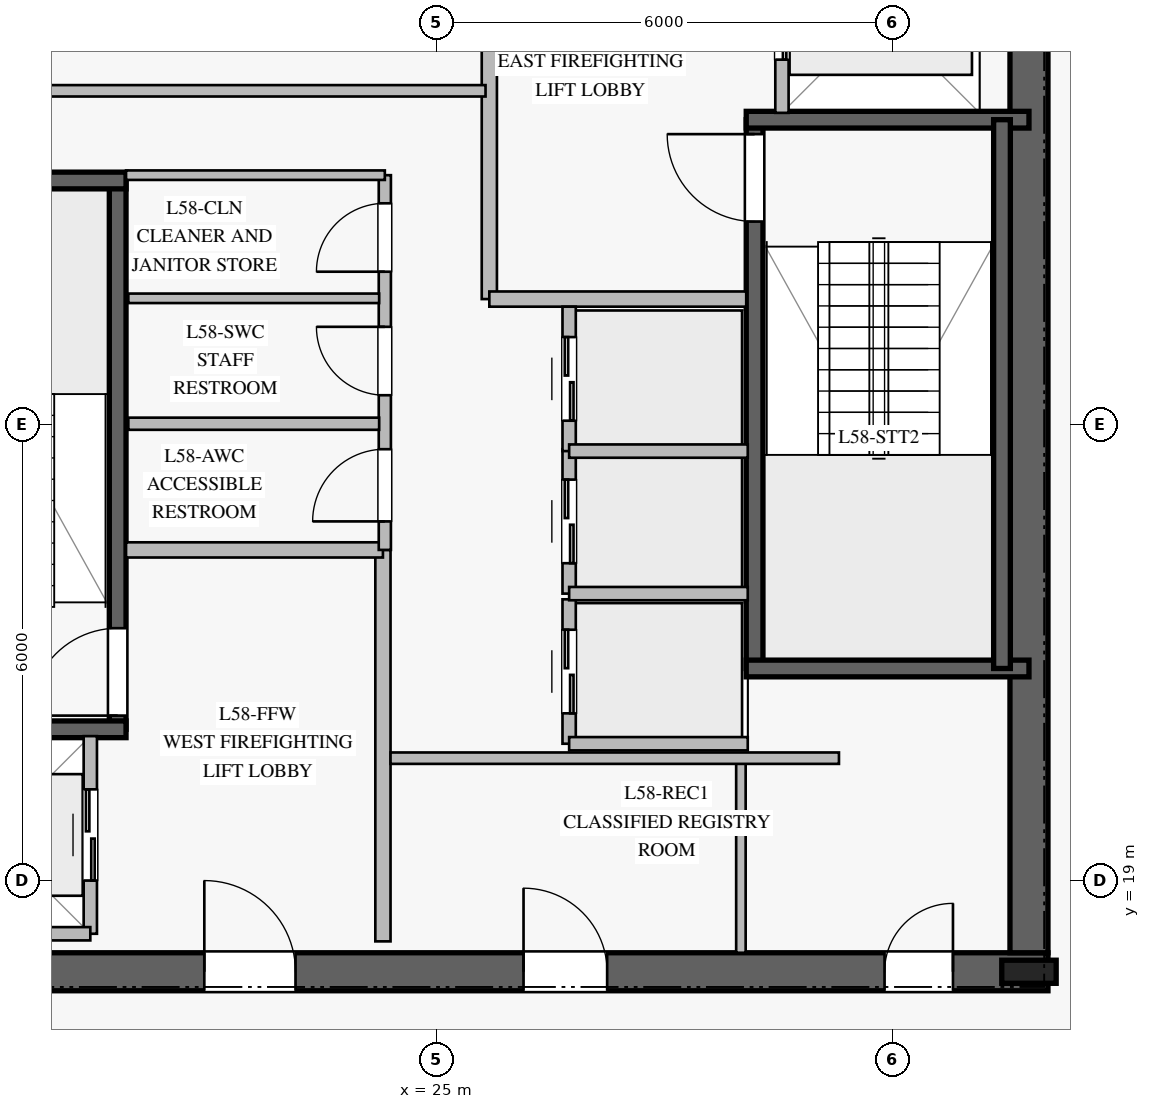
"""IFC4 building model, lengths in metres.
Left out: names, types, materials, properties, quantities, classifications, styles, units other than length and angle.
Written with IfcOpenShell. Run it as: python <this file> out.ifc"""

import sys

from ifc_helpers import new_model, si_unit, direction, frame, frame_2d, origin, origin_2d, place, context, subcontext, project, spatial, rectangle, i_section, extrude, element, fill, save


model = new_model("IFC4")
c1 = context("Model", 3, precision=1e-05, world=origin(), true_north=direction((0.0, 1.0)))
c2 = subcontext(c1, "Body", "Model", "MODEL_VIEW")
j1 = project(units=[si_unit("LENGTHUNIT", "METRE"), si_unit("PLANEANGLEUNIT", "RADIAN")], contexts=[c1])
p1 = place(None, origin())
s1 = spatial("IfcSite", under=j1, at=p1, CompositionType="ELEMENT")
p2 = place(p1, origin())
s2 = spatial("IfcBuilding", under=s1, at=p2, CompositionType="ELEMENT")
p3 = place(p2, frame((0.0, 0.0, 240.8)))
s3 = spatial("IfcBuildingStorey", under=s2, at=p3, CompositionType="ELEMENT", Elevation=240.8)
p4 = place(p3, frame((16.95, 17.8, 0.0), z_axis=(0.0, 0.0, 1.0), x_axis=(1.0, 0.0, 0.0)))
e1 = element("IfcWall", 1, at=p4, inside=s3, PredefinedType="SHEAR", context=c2, shape_type="SweptSolid", body=[
    extrude(rectangle(XDim=16.1, YDim=0.5, at=frame_2d((8.05, 0.0))), origin(), (0.0, 0.0, 1.0), 3.7),
])
p5 = place(p4, frame((5.0, 0.0, 0.0)))
e2 = element("IfcOpeningElement", 2, at=p5, cuts=e1, PredefinedType="OPENING", context=c2, shape_type="SweptSolid", body=[
    extrude(rectangle(XDim=1.2, YDim=2.25, at=frame_2d((0.6, 1.125))), frame((0.0, 0.26, 0.0), z_axis=(0.0, -1.0, 0.0), x_axis=(1.0, 0.0, 0.0)), (0.0, 0.0, 1.0), 0.52),
])
p6 = place(p4, frame((13.95, 0.0, 0.0)))
e3 = element("IfcOpeningElement", 3, at=p6, cuts=e1, PredefinedType="OPENING", context=c2, shape_type="SweptSolid", body=[
    extrude(rectangle(XDim=0.9, YDim=2.1, at=frame_2d((0.45, 1.05))), frame((0.0, 0.26, 0.0), z_axis=(0.0, -1.0, 0.0), x_axis=(1.0, 0.0, 0.0)), (0.0, 0.0, 1.0), 0.52),
])
p7 = place(p4, frame((9.2, 0.0, 0.0)))
e4 = element("IfcOpeningElement", 4, at=p7, cuts=e1, PredefinedType="OPENING", context=c2, shape_type="SweptSolid", body=[
    extrude(rectangle(XDim=1.1, YDim=2.2, at=frame_2d((0.55, 1.1))), frame((0.0, 0.26, 0.0), z_axis=(0.0, -1.0, 0.0), x_axis=(1.0, 0.0, 0.0)), (0.0, 0.0, 1.0), 0.52),
])
p8 = place(p3, frame((32.8, 18.05, 0.0), z_axis=(0.0, 0.0, 1.0), x_axis=(0.0, 1.0, 0.0)))
e5 = element("IfcWall", 5, at=p8, inside=s3, PredefinedType="SHEAR", context=c2, shape_type="SweptSolid", body=[
    extrude(rectangle(XDim=13.9, YDim=0.5, at=frame_2d((6.95, 0.0))), origin(), (0.0, 0.0, 1.0), 3.7),
])
p9 = place(p3, frame((32.8, 17.8, 0.0), z_axis=(0.0, 0.0, 1.0), x_axis=(1.0, 0.0, 0.0)))
e6 = element("IfcColumn", 6, at=p9, inside=s3, PredefinedType="COLUMN", context=c2, shape_type="SweptSolid", body=[
    extrude(i_section(OverallWidth=0.304, OverallDepth=0.716, WebThickness=0.021, FlangeThickness=0.04, at=origin_2d()), origin(), (0.0, 0.0, 1.0), 4.0),
])
p10 = place(p3, frame((20.81, 20.99, 0.0), z_axis=(0.0, 0.0, 1.0), x_axis=(0.0, 1.0, 0.0)))
e7 = element("IfcWall", 7, at=p10, inside=s3, PredefinedType="SOLIDWALL", context=c2, shape_type="SweptSolid", body=[
    extrude(rectangle(XDim=7.22, YDim=0.22, at=frame_2d((3.61, 0.0))), origin(), (0.0, 0.0, 1.0), 3.7),
])
p11 = place(p10, frame((0.18, 0.0, 0.0)))
e8 = element("IfcOpeningElement", 8, at=p11, cuts=e7, PredefinedType="OPENING", context=c2, shape_type="SweptSolid", body=[
    extrude(rectangle(XDim=1.15, YDim=2.2, at=frame_2d((0.575, 1.1))), frame((0.0, 0.12, 0.0), z_axis=(0.0, -1.0, 0.0), x_axis=(1.0, 0.0, 0.0)), (0.0, 0.0, 1.0), 0.24),
])
for number, where, z_axis, x_axis in (
    (9, (17.2, 20.99, 0.0), (0.0, 0.0, 1.0), (1.0, 0.0, 0.0)),
    (10, (17.2, 28.21, 0.0), (0.0, 0.0, 1.0), (1.0, 0.0, 0.0)),
):
    element("IfcWall", number, at=place(p3, frame(where, z_axis=z_axis, x_axis=x_axis)), inside=s3, PredefinedType="SOLIDWALL", context=c2, shape_type="SweptSolid", body=[
        extrude(rectangle(XDim=3.72, YDim=0.22, at=frame_2d((1.86, 0.0))), origin(), (0.0, 0.0, 1.0), 3.7),
    ])
p12 = place(p3, frame((29.19, 21.79, 0.0), z_axis=(0.0, 0.0, 1.0), x_axis=(0.0, 1.0, 0.0)))
e11 = element("IfcWall", 11, at=p12, inside=s3, PredefinedType="SOLIDWALL", context=c2, shape_type="SweptSolid", body=[
    extrude(rectangle(XDim=7.22, YDim=0.22, at=frame_2d((3.61, 0.0))), origin(), (0.0, 0.0, 1.0), 3.7),
])
p13 = place(p12, frame((5.88, 0.0, 0.0)))
e12 = element("IfcOpeningElement", 12, at=p13, cuts=e11, PredefinedType="OPENING", context=c2, shape_type="SweptSolid", body=[
    extrude(rectangle(XDim=1.15, YDim=2.2, at=frame_2d((0.575, 1.1))), frame((0.0, 0.12, 0.0), z_axis=(0.0, -1.0, 0.0), x_axis=(1.0, 0.0, 0.0)), (0.0, 0.0, 1.0), 0.24),
])
for number, where, z_axis, x_axis in (
    (13, (29.08, 21.79, 0.0), (0.0, 0.0, 1.0), (1.0, 0.0, 0.0)),
    (14, (29.08, 29.01, 0.0), (0.0, 0.0, 1.0), (1.0, 0.0, 0.0)),
):
    element("IfcWall", number, at=place(p3, frame(where, z_axis=z_axis, x_axis=x_axis)), inside=s3, PredefinedType="SOLIDWALL", context=c2, shape_type="SweptSolid", body=[
        extrude(rectangle(XDim=3.72, YDim=0.22, at=frame_2d((1.86, 0.0))), origin(), (0.0, 0.0, 1.0), 3.7),
    ])
p14 = place(p3, frame((32.445, 29.01, 0.0), z_axis=(0.0, 0.0, 1.0), x_axis=(0.0, -1.0, 0.0)))
e15 = element("IfcWall", 15, at=p14, inside=s3, PredefinedType="SOLIDWALL", context=c2, shape_type="SweptSolid", body=[
    extrude(rectangle(XDim=7.22, YDim=0.22, at=frame_2d((3.61, 0.0))), origin(), (0.0, 0.0, 1.0), 3.7),
])
p15 = place(p3, frame((24.3, 18.2, 0.0), z_axis=(0.0, 0.0, 1.0), x_axis=(0.0, 1.0, 0.0)))
e16 = element("IfcWall", 16, at=p15, inside=s3, PredefinedType="PARTITIONING", context=c2, shape_type="SweptSolid", body=[
    extrude(rectangle(XDim=5.15, YDim=0.2, at=frame_2d((2.575, 0.0))), origin(), (0.0, 0.0, 1.0), 3.7),
])
p16 = place(p3, frame((20.92, 23.35, 0.0), z_axis=(0.0, 0.0, 1.0), x_axis=(1.0, 0.0, 0.0)))
e17 = element("IfcWall", 17, at=p16, inside=s3, PredefinedType="PARTITIONING", context=c2, shape_type="SweptSolid", body=[
    extrude(rectangle(XDim=3.38, YDim=0.2, at=frame_2d((1.69, 0.0))), origin(), (0.0, 0.0, 1.0), 3.7),
])
p17 = place(p3, frame((25.7, 26.65, 0.0), z_axis=(0.0, 0.0, 1.0), x_axis=(0.0, 1.0, 0.0)))
e18 = element("IfcWall", 18, at=p17, inside=s3, PredefinedType="PARTITIONING", context=c2, shape_type="SweptSolid", body=[
    extrude(rectangle(XDim=5.15, YDim=0.2, at=frame_2d((2.575, 0.0))), origin(), (0.0, 0.0, 1.0), 3.7),
])
p18 = place(p3, frame((25.7, 26.65, 0.0), z_axis=(0.0, 0.0, 1.0), x_axis=(1.0, 0.0, 0.0)))
e19 = element("IfcWall", 19, at=p18, inside=s3, PredefinedType="PARTITIONING", context=c2, shape_type="SweptSolid", body=[
    extrude(rectangle(XDim=3.38, YDim=0.2, at=frame_2d((1.69, 0.0))), origin(), (0.0, 0.0, 1.0), 3.7),
])
p19 = place(p3, frame((24.325, 23.35, 0.0), z_axis=(0.0, 0.0, 1.0), x_axis=(0.0, 1.0, 0.0)))
e20 = element("IfcWall", 20, at=p19, inside=s3, PredefinedType="PLUMBINGWALL", context=c2, shape_type="SweptSolid", body=[
    extrude(rectangle(XDim=4.93, YDim=0.16, at=frame_2d((2.465, 0.0))), origin(), (0.0, 0.0, 1.0), 3.7),
])
p20 = place(p19, frame((0.375, 0.0, 0.0)))
e21 = element("IfcOpeningElement", 21, at=p20, cuts=e20, PredefinedType="OPENING", context=c2, shape_type="SweptSolid", body=[
    extrude(rectangle(XDim=0.95, YDim=2.1, at=frame_2d((0.475, 1.05))), frame((0.0, 0.09, 0.0), z_axis=(0.0, -1.0, 0.0), x_axis=(1.0, 0.0, 0.0)), (0.0, 0.0, 1.0), 0.18),
])
p21 = place(p19, frame((2.035, 0.0, 0.0)))
e22 = element("IfcOpeningElement", 22, at=p21, cuts=e20, PredefinedType="OPENING", context=c2, shape_type="SweptSolid", body=[
    extrude(rectangle(XDim=0.9, YDim=2.1, at=frame_2d((0.45, 1.05))), frame((0.0, 0.09, 0.0), z_axis=(0.0, -1.0, 0.0), x_axis=(1.0, 0.0, 0.0)), (0.0, 0.0, 1.0), 0.18),
])
p22 = place(p19, frame((3.66, 0.0, 0.0)))
e23 = element("IfcOpeningElement", 23, at=p22, cuts=e20, PredefinedType="OPENING", context=c2, shape_type="SweptSolid", body=[
    extrude(rectangle(XDim=0.9, YDim=2.1, at=frame_2d((0.45, 1.05))), frame((0.0, 0.09, 0.0), z_axis=(0.0, -1.0, 0.0), x_axis=(1.0, 0.0, 0.0)), (0.0, 0.0, 1.0), 0.18),
])
p23 = place(p3, frame((20.92, 28.28, 0.0), z_axis=(0.0, 0.0, 1.0), x_axis=(1.0, 0.0, 0.0)))
e24 = element("IfcWall", 24, at=p23, inside=s3, PredefinedType="PARTITIONING", context=c2, shape_type="SweptSolid", body=[
    extrude(rectangle(XDim=3.405, YDim=0.125, at=frame_2d((1.703, 0.0))), origin(), (0.0, 0.0, 1.0), 3.7),
])
p24 = place(p3, frame((29.01, 18.05, 0.0), z_axis=(0.0, 0.0, 1.0), x_axis=(0.0, 1.0, 0.0)))
e25 = element("IfcWall", 25, at=p24, inside=s3, PredefinedType="PARTITIONING", context=c2, shape_type="SweptSolid", body=[
    extrude(rectangle(XDim=2.5, YDim=0.125, at=frame_2d((1.25, 0.0))), origin(), (0.0, 0.0, 1.0), 3.0),
])
p25 = place(p3, frame((20.95, 25.01, 0.0), z_axis=(0.0, 0.0, 1.0), x_axis=(1.0, 0.0, 0.0)))
e26 = element("IfcWall", 26, at=p25, inside=s3, PredefinedType="PLUMBINGWALL", context=c2, shape_type="SweptSolid", body=[
    extrude(rectangle(XDim=3.3, YDim=0.16, at=frame_2d((1.65, 0.0))), origin(), (0.0, 0.0, 1.0), 3.7),
])
p26 = place(p3, frame((20.95, 26.66, 0.0), z_axis=(0.0, 0.0, 1.0), x_axis=(1.0, 0.0, 0.0)))
e27 = element("IfcWall", 27, at=p26, inside=s3, PredefinedType="PARTITIONING", context=c2, shape_type="SweptSolid", body=[
    extrude(rectangle(XDim=3.3, YDim=0.125, at=frame_2d((1.65, 0.0))), origin(), (0.0, 0.0, 1.0), 3.7),
])
p27 = place(p3, frame((24.4, 20.61, 0.0), z_axis=(0.0, 0.0, 1.0), x_axis=(1.0, 0.0, 0.0)))
e28 = element("IfcWall", 28, at=p27, inside=s3, PredefinedType="PARTITIONING", context=c2, shape_type="SweptSolid", body=[
    extrude(rectangle(XDim=5.9, YDim=0.15, at=frame_2d((2.95, 0.0))), origin(), (0.0, 0.0, 1.0), 3.7),
])
p28 = place(p3, frame((19.75, 29.39, 0.0), z_axis=(0.0, 0.0, 1.0), x_axis=(1.0, 0.0, 0.0)))
e29 = element("IfcWall", 29, at=p28, inside=s3, PredefinedType="PARTITIONING", context=c2, shape_type="SweptSolid", body=[
    extrude(rectangle(XDim=5.9, YDim=0.15, at=frame_2d((2.95, 0.0))), origin(), (0.0, 0.0, 1.0), 3.7),
])
p29 = place(p3, frame((26.75, 20.8, 0.0), z_axis=(0.0, 0.0, 1.0), x_axis=(0.0, 1.0, 0.0)))
e30 = element("IfcWall", 30, at=p29, inside=s3, PredefinedType="PARTITIONING", context=c2, shape_type="SweptSolid", body=[
    extrude(rectangle(XDim=1.9, YDim=0.175, at=frame_2d((0.95, 0.0))), origin(), (0.0, 0.0, 1.0), 3.7),
])
p30 = place(p29, frame((0.4, 0.0, 0.0)))
e31 = element("IfcOpeningElement", 31, at=p30, cuts=e30, PredefinedType="OPENING", context=c2, shape_type="SweptSolid", body=[
    extrude(rectangle(XDim=1.1, YDim=2.2, at=frame_2d((0.55, 1.1))), frame((0.0, 0.098, 0.0), z_axis=(0.0, -1.0, 0.0), x_axis=(1.0, 0.0, 0.0)), (0.0, 0.0, 1.0), 0.195),
])
p31 = place(p3, frame((26.75, 20.8, 0.0), z_axis=(0.0, 0.0, 1.0), x_axis=(1.0, 0.0, 0.0)))
e32 = element("IfcWall", 32, at=p31, inside=s3, PredefinedType="PARTITIONING", context=c2, shape_type="SweptSolid", body=[
    extrude(rectangle(XDim=2.35, YDim=0.175, at=frame_2d((1.175, 0.0))), origin(), (0.0, 0.0, 1.0), 3.7),
])
p32 = place(p3, frame((26.75, 22.775, 0.0), z_axis=(0.0, 0.0, 1.0), x_axis=(0.0, 1.0, 0.0)))
e33 = element("IfcWall", 33, at=p32, inside=s3, PredefinedType="PARTITIONING", context=c2, shape_type="SweptSolid", body=[
    extrude(rectangle(XDim=1.9, YDim=0.175, at=frame_2d((0.95, 0.0))), origin(), (0.0, 0.0, 1.0), 3.7),
])
p33 = place(p32, frame((0.4, 0.0, 0.0)))
e34 = element("IfcOpeningElement", 34, at=p33, cuts=e33, PredefinedType="OPENING", context=c2, shape_type="SweptSolid", body=[
    extrude(rectangle(XDim=1.1, YDim=2.2, at=frame_2d((0.55, 1.1))), frame((0.0, 0.098, 0.0), z_axis=(0.0, -1.0, 0.0), x_axis=(1.0, 0.0, 0.0)), (0.0, 0.0, 1.0), 0.195),
])
p34 = place(p3, frame((26.75, 22.775, 0.0), z_axis=(0.0, 0.0, 1.0), x_axis=(1.0, 0.0, 0.0)))
e35 = element("IfcWall", 35, at=p34, inside=s3, PredefinedType="PARTITIONING", context=c2, shape_type="SweptSolid", body=[
    extrude(rectangle(XDim=2.35, YDim=0.175, at=frame_2d((1.175, 0.0))), origin(), (0.0, 0.0, 1.0), 3.7),
])
p35 = place(p3, frame((26.75, 24.65, 0.0), z_axis=(0.0, 0.0, 1.0), x_axis=(0.0, 1.0, 0.0)))
e36 = element("IfcWall", 36, at=p35, inside=s3, PredefinedType="PARTITIONING", context=c2, shape_type="SweptSolid", body=[
    extrude(rectangle(XDim=1.9, YDim=0.175, at=frame_2d((0.95, 0.0))), origin(), (0.0, 0.0, 1.0), 3.7),
])
p36 = place(p35, frame((0.4, 0.0, 0.0)))
e37 = element("IfcOpeningElement", 37, at=p36, cuts=e36, PredefinedType="OPENING", context=c2, shape_type="SweptSolid", body=[
    extrude(rectangle(XDim=1.1, YDim=2.2, at=frame_2d((0.55, 1.1))), frame((0.0, 0.098, 0.0), z_axis=(0.0, -1.0, 0.0), x_axis=(1.0, 0.0, 0.0)), (0.0, 0.0, 1.0), 0.195),
])
p37 = place(p3, frame((26.75, 24.65, 0.0), z_axis=(0.0, 0.0, 1.0), x_axis=(1.0, 0.0, 0.0)))
e38 = element("IfcWall", 38, at=p37, inside=s3, PredefinedType="PARTITIONING", context=c2, shape_type="SweptSolid", body=[
    extrude(rectangle(XDim=2.35, YDim=0.175, at=frame_2d((1.175, 0.0))), origin(), (0.0, 0.0, 1.0), 3.7),
])
p38 = place(p3, frame((20.45, 18.3, 0.0), z_axis=(0.0, 0.0, 1.0), x_axis=(0.0, 1.0, 0.0)))
e39 = element("IfcWall", 39, at=p38, inside=s3, PredefinedType="PARTITIONING", context=c2, shape_type="SweptSolid", body=[
    extrude(rectangle(XDim=2.6, YDim=0.175, at=frame_2d((1.3, 0.0))), origin(), (0.0, 0.0, 1.0), 3.7),
])
p39 = place(p38, frame((0.7, 0.0, 0.0)))
e40 = element("IfcOpeningElement", 40, at=p39, cuts=e39, PredefinedType="OPENING", context=c2, shape_type="SweptSolid", body=[
    extrude(rectangle(XDim=1.2, YDim=2.2, at=frame_2d((0.6, 1.1))), frame((0.0, 0.098, 0.0), z_axis=(0.0, -1.0, 0.0), x_axis=(1.0, 0.0, 0.0)), (0.0, 0.0, 1.0), 0.195),
])
p40 = place(p3, frame((17.85, 18.3, 0.0), z_axis=(0.0, 0.0, 1.0), x_axis=(1.0, 0.0, 0.0)))
e41 = element("IfcWall", 41, at=p40, inside=s3, PredefinedType="PARTITIONING", context=c2, shape_type="SweptSolid", body=[
    extrude(rectangle(XDim=2.6, YDim=0.175, at=frame_2d((1.3, 0.0))), origin(), (0.0, 0.0, 1.0), 3.7),
])
p41 = place(p3, frame((29.55, 29.1, 0.0), z_axis=(0.0, 0.0, 1.0), x_axis=(0.0, 1.0, 0.0)))
e42 = element("IfcWall", 42, at=p41, inside=s3, PredefinedType="PARTITIONING", context=c2, shape_type="SweptSolid", body=[
    extrude(rectangle(XDim=2.6, YDim=0.175, at=frame_2d((1.3, 0.0))), origin(), (0.0, 0.0, 1.0), 3.7),
])
p42 = place(p41, frame((0.7, 0.0, 0.0)))
e43 = element("IfcOpeningElement", 43, at=p42, cuts=e42, PredefinedType="OPENING", context=c2, shape_type="SweptSolid", body=[
    extrude(rectangle(XDim=1.2, YDim=2.2, at=frame_2d((0.6, 1.1))), frame((0.0, 0.098, 0.0), z_axis=(0.0, -1.0, 0.0), x_axis=(1.0, 0.0, 0.0)), (0.0, 0.0, 1.0), 0.195),
])
p43 = place(p11, origin())
e44 = element("IfcDoor", 44, at=p43, inside=s3, OperationType="SINGLE_SWING_LEFT", PredefinedType="DOOR", context=c2, shape_type="SweptSolid", body=[
    extrude(rectangle(XDim=1.15, YDim=2.2, at=frame_2d((0.575, 1.1))), frame((0.0, 0.025, 0.0), z_axis=(0.0, -1.0, 0.0), x_axis=(1.0, 0.0, 0.0)), (0.0, 0.0, 1.0), 0.05),
])
fill(e8, e44)
p44 = place(p13, origin())
e45 = element("IfcDoor", 45, at=p44, inside=s3, OperationType="SINGLE_SWING_RIGHT", PredefinedType="DOOR", context=c2, shape_type="SweptSolid", body=[
    extrude(rectangle(XDim=1.15, YDim=2.2, at=frame_2d((0.575, 1.1))), frame((0.0, 0.025, 0.0), z_axis=(0.0, -1.0, 0.0), x_axis=(1.0, 0.0, 0.0)), (0.0, 0.0, 1.0), 0.05),
])
fill(e12, e45)
p45 = place(p5, origin())
e46 = element("IfcDoor", 46, at=p45, inside=s3, OperationType="SINGLE_SWING_LEFT", PredefinedType="DOOR", context=c2, shape_type="SweptSolid", body=[
    extrude(rectangle(XDim=1.2, YDim=2.25, at=frame_2d((0.6, 1.125))), frame((0.0, 0.025, 0.0), z_axis=(0.0, -1.0, 0.0), x_axis=(1.0, 0.0, 0.0)), (0.0, 0.0, 1.0), 0.05),
])
fill(e2, e46)
p46 = place(p20, origin())
e47 = element("IfcDoor", 47, at=p46, inside=s3, OperationType="SINGLE_SWING_LEFT", PredefinedType="DOOR", context=c2, shape_type="SweptSolid", body=[
    extrude(rectangle(XDim=0.95, YDim=2.1, at=frame_2d((0.475, 1.05))), frame((0.0, 0.025, 0.0), z_axis=(0.0, -1.0, 0.0), x_axis=(1.0, 0.0, 0.0)), (0.0, 0.0, 1.0), 0.05),
])
fill(e21, e47)
p47 = place(p21, origin())
e48 = element("IfcDoor", 48, at=p47, inside=s3, OperationType="SINGLE_SWING_RIGHT", PredefinedType="DOOR", context=c2, shape_type="SweptSolid", body=[
    extrude(rectangle(XDim=0.9, YDim=2.1, at=frame_2d((0.45, 1.05))), frame((0.0, 0.025, 0.0), z_axis=(0.0, -1.0, 0.0), x_axis=(1.0, 0.0, 0.0)), (0.0, 0.0, 1.0), 0.05),
])
fill(e22, e48)
p48 = place(p22, origin())
e49 = element("IfcDoor", 49, at=p48, inside=s3, OperationType="SINGLE_SWING_LEFT", PredefinedType="DOOR", context=c2, shape_type="SweptSolid", body=[
    extrude(rectangle(XDim=0.9, YDim=2.1, at=frame_2d((0.45, 1.05))), frame((0.0, 0.025, 0.0), z_axis=(0.0, -1.0, 0.0), x_axis=(1.0, 0.0, 0.0)), (0.0, 0.0, 1.0), 0.05),
])
fill(e23, e49)
p49 = place(p6, origin())
e50 = element("IfcDoor", 50, at=p49, inside=s3, OperationType="SINGLE_SWING_RIGHT", PredefinedType="DOOR", context=c2, shape_type="SweptSolid", body=[
    extrude(rectangle(XDim=0.9, YDim=2.1, at=frame_2d((0.45, 1.05))), frame((0.0, 0.025, 0.0), z_axis=(0.0, -1.0, 0.0), x_axis=(1.0, 0.0, 0.0)), (0.0, 0.0, 1.0), 0.05),
])
fill(e3, e50)
p50 = place(p7, origin())
e51 = element("IfcDoor", 51, at=p50, inside=s3, OperationType="SINGLE_SWING_LEFT", PredefinedType="DOOR", context=c2, shape_type="SweptSolid", body=[
    extrude(rectangle(XDim=1.1, YDim=2.2, at=frame_2d((0.55, 1.1))), frame((0.0, 0.025, 0.0), z_axis=(0.0, -1.0, 0.0), x_axis=(1.0, 0.0, 0.0)), (0.0, 0.0, 1.0), 0.05),
])
fill(e4, e51)
p51 = place(p30, origin())
e52 = element("IfcDoor", 52, at=p51, inside=s3, OperationType="DOUBLE_DOOR_SLIDING", PredefinedType="DOOR", context=c2, shape_type="SweptSolid", body=[
    extrude(rectangle(XDim=1.1, YDim=2.2, at=frame_2d((0.55, 1.1))), frame((0.0, 0.025, 0.0), z_axis=(0.0, -1.0, 0.0), x_axis=(1.0, 0.0, 0.0)), (0.0, 0.0, 1.0), 0.05),
])
fill(e31, e52)
p52 = place(p33, origin())
e53 = element("IfcDoor", 53, at=p52, inside=s3, OperationType="DOUBLE_DOOR_SLIDING", PredefinedType="DOOR", context=c2, shape_type="SweptSolid", body=[
    extrude(rectangle(XDim=1.1, YDim=2.2, at=frame_2d((0.55, 1.1))), frame((0.0, 0.025, 0.0), z_axis=(0.0, -1.0, 0.0), x_axis=(1.0, 0.0, 0.0)), (0.0, 0.0, 1.0), 0.05),
])
fill(e34, e53)
p53 = place(p36, origin())
e54 = element("IfcDoor", 54, at=p53, inside=s3, OperationType="DOUBLE_DOOR_SLIDING", PredefinedType="DOOR", context=c2, shape_type="SweptSolid", body=[
    extrude(rectangle(XDim=1.1, YDim=2.2, at=frame_2d((0.55, 1.1))), frame((0.0, 0.025, 0.0), z_axis=(0.0, -1.0, 0.0), x_axis=(1.0, 0.0, 0.0)), (0.0, 0.0, 1.0), 0.05),
])
fill(e37, e54)
p54 = place(p39, origin())
e55 = element("IfcDoor", 55, at=p54, inside=s3, OperationType="DOUBLE_DOOR_SLIDING", PredefinedType="DOOR", context=c2, shape_type="SweptSolid", body=[
    extrude(rectangle(XDim=1.2, YDim=2.2, at=frame_2d((0.6, 1.1))), frame((0.0, 0.025, 0.0), z_axis=(0.0, -1.0, 0.0), x_axis=(1.0, 0.0, 0.0)), (0.0, 0.0, 1.0), 0.05),
])
fill(e40, e55)
p55 = place(p42, origin())
e56 = element("IfcDoor", 56, at=p55, inside=s3, OperationType="DOUBLE_DOOR_SLIDING", PredefinedType="DOOR", context=c2, shape_type="SweptSolid", body=[
    extrude(rectangle(XDim=1.2, YDim=2.2, at=frame_2d((0.6, 1.1))), frame((0.0, 0.025, 0.0), z_axis=(0.0, -1.0, 0.0), x_axis=(1.0, 0.0, 0.0)), (0.0, 0.0, 1.0), 0.05),
])
fill(e43, e56)
save(model, sys.argv[1])
